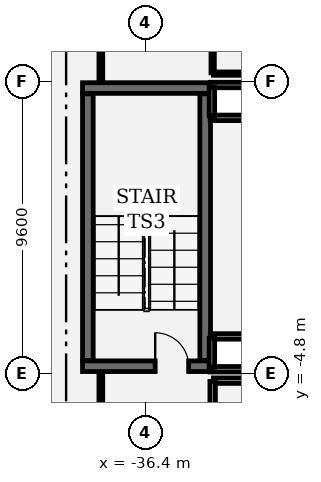
"""IFC4 building model, lengths in metres.
Left out: names, types, materials, properties, quantities, classifications, styles, units other than length and angle.
Written with IfcOpenShell. Run it as: python <this file> out.ifc"""

import sys

from ifc_helpers import new_model, si_unit, direction, frame, frame_2d, origin, place, context, subcontext, project, spatial, rectangle, extrude, element, fill, save


model = new_model("IFC4")
c1 = context("Model", 3, precision=1e-05, world=origin(), true_north=direction((0.0, 1.0)))
c2 = subcontext(c1, "Body", "Model", "MODEL_VIEW")
j1 = project(units=[si_unit("LENGTHUNIT", "METRE"), si_unit("PLANEANGLEUNIT", "RADIAN")], contexts=[c1])
p1 = place(None, origin())
s1 = spatial("IfcSite", under=j1, at=p1, CompositionType="ELEMENT")
p2 = place(p1, origin())
s2 = spatial("IfcBuilding", under=s1, at=p2, CompositionType="ELEMENT")
p3 = place(p2, frame((0.0, 0.0, 268.2)))
s3 = spatial("IfcBuildingStorey", under=s2, at=p3, CompositionType="ELEMENT", Elevation=268.2)
p4 = place(p3, frame((-38.46, -4.575, 0.0), z_axis=(0.0, 0.0, 1.0), x_axis=(1.0, 0.0, 0.0)))
e1 = element("IfcWall", 1, at=p4, inside=s3, PredefinedType="SHEAR", context=c2, shape_type="SweptSolid", body=[
    extrude(rectangle(XDim=4.21, YDim=0.35, at=frame_2d((2.105, 0.0))), origin(), (0.0, 0.0, 1.0), 3.91),
])
p5 = place(p4, frame((2.39, 0.0, 0.0)))
e2 = element("IfcOpeningElement", 2, at=p5, cuts=e1, PredefinedType="OPENING", context=c2, shape_type="SweptSolid", body=[
    extrude(rectangle(XDim=1.1, YDim=2.2, at=frame_2d((0.55, 1.1))), frame((0.0, 0.185, 0.0), z_axis=(0.0, -1.0, 0.0), x_axis=(1.0, 0.0, 0.0)), (0.0, 0.0, 1.0), 0.37),
])
p6 = place(p3, frame((-34.25, 4.575, 0.0), z_axis=(0.0, 0.0, 1.0), x_axis=(-1.0, 0.0, 0.0)))
e3 = element("IfcWall", 3, at=p6, inside=s3, PredefinedType="SHEAR", context=c2, shape_type="SweptSolid", body=[
    extrude(rectangle(XDim=4.21, YDim=0.35, at=frame_2d((2.105, 0.0))), origin(), (0.0, 0.0, 1.0), 3.91),
])
for number, where, z_axis, x_axis in (
    (4, (-34.425, -4.385, 0.0), (0.0, 0.0, 1.0), (0.0, 1.0, 0.0)),
    (5, (-38.285, 4.385, 0.0), (0.0, 0.0, 1.0), (0.0, -1.0, 0.0)),
):
    element("IfcWall", number, at=place(p3, frame(where, z_axis=z_axis, x_axis=x_axis)), inside=s3, PredefinedType="SHEAR", context=c2, shape_type="SweptSolid", body=[
        extrude(rectangle(XDim=8.77, YDim=0.35, at=frame_2d((4.385, 0.0))), origin(), (0.0, 0.0, 1.0), 3.91),
    ])
for number, where, z_axis, x_axis in (
    (6, (-32.99, 3.595, 0.0), (0.0, 0.0, 1.0), (-1.0, 0.0, 0.0)),
    (7, (-34.26, 4.675, 0.0), (0.0, 0.0, 1.0), (1.0, 0.0, 0.0)),
):
    element("IfcWall", number, at=place(p3, frame(where, z_axis=z_axis, x_axis=x_axis)), inside=s3, PredefinedType="PARTITIONING", context=c2, shape_type="SweptSolid", body=[
        extrude(rectangle(XDim=1.27, YDim=0.18, at=frame_2d((0.635, 0.0))), origin(), (0.0, 0.0, 1.0), 3.91),
    ])
p7 = place(p3, frame((-34.205, 3.66, 0.0), z_axis=(0.0, 0.0, 1.0), x_axis=(0.0, 1.0, 0.0)))
e8 = element("IfcWall", 8, at=p7, inside=s3, PredefinedType="PARTITIONING", context=c2, shape_type="SweptSolid", body=[
    extrude(rectangle(XDim=0.95, YDim=0.18, at=frame_2d((0.475, 0.0))), origin(), (0.0, 0.0, 1.0), 3.91),
])
for number, where, z_axis, x_axis in (
    (9, (-32.99, -4.675, 0.0), (0.0, 0.0, 1.0), (-1.0, 0.0, 0.0)),
    (10, (-34.26, -3.595, 0.0), (0.0, 0.0, 1.0), (1.0, 0.0, 0.0)),
):
    element("IfcWall", number, at=place(p3, frame(where, z_axis=z_axis, x_axis=x_axis)), inside=s3, PredefinedType="PARTITIONING", context=c2, shape_type="SweptSolid", body=[
        extrude(rectangle(XDim=1.27, YDim=0.18, at=frame_2d((0.635, 0.0))), origin(), (0.0, 0.0, 1.0), 3.91),
    ])
p8 = place(p3, frame((-34.205, -4.61, 0.0), z_axis=(0.0, 0.0, 1.0), x_axis=(0.0, 1.0, 0.0)))
e11 = element("IfcWall", 11, at=p8, inside=s3, PredefinedType="PARTITIONING", context=c2, shape_type="SweptSolid", body=[
    extrude(rectangle(XDim=0.95, YDim=0.18, at=frame_2d((0.475, 0.0))), origin(), (0.0, 0.0, 1.0), 3.91),
])
p9 = place(p3, frame((-34.18, 8.225, 0.0), z_axis=(0.0, 0.0, 1.0), x_axis=(0.0, -1.0, 0.0)))
e12 = element("IfcWall", 12, at=p9, inside=s3, PredefinedType="PARTITIONING", context=c2, shape_type="SweptSolid", body=[
    extrude(rectangle(XDim=3.15, YDim=0.11, at=frame_2d((1.575, 0.0))), origin(), (0.0, 0.0, 1.0), 3.91),
])
p10 = place(p3, frame((-34.155, 5.05, 0.0), z_axis=(0.0, 0.0, 1.0), x_axis=(1.0, 0.0, 0.0)))
e13 = element("IfcWall", 13, at=p10, inside=s3, PredefinedType="PARTITIONING", context=c2, shape_type="SweptSolid", body=[
    extrude(rectangle(XDim=3.19, YDim=0.11, at=frame_2d((1.595, 0.0))), origin(), (0.0, 0.0, 1.0), 3.91),
])
p11 = place(p3, frame((-30.965, -5.05, 0.0), z_axis=(0.0, 0.0, 1.0), x_axis=(-1.0, 0.0, 0.0)))
e14 = element("IfcWall", 14, at=p11, inside=s3, PredefinedType="PARTITIONING", context=c2, shape_type="SweptSolid", body=[
    extrude(rectangle(XDim=3.19, YDim=0.18, at=frame_2d((1.595, 0.0))), origin(), (0.0, 0.0, 1.0), 3.91),
])
p12 = place(p3, frame((-34.18, -5.075, 0.0), z_axis=(0.0, 0.0, 1.0), x_axis=(0.0, -1.0, 0.0)))
e15 = element("IfcWall", 15, at=p12, inside=s3, PredefinedType="PARTITIONING", context=c2, shape_type="SweptSolid", body=[
    extrude(rectangle(XDim=3.25, YDim=0.18, at=frame_2d((1.625, 0.0))), origin(), (0.0, 0.0, 1.0), 3.91),
])
for number, where, z_axis, x_axis in (
    (16, (-37.858, -4.783, 0.0), (0.0, 0.0, 1.0), (0.0, -1.0, 0.0)),
    (17, (-37.858, 11.265, 0.0), (0.0, 0.0, 1.0), (0.0, -1.0, 0.0)),
):
    element("IfcWall", number, at=place(p3, frame(where, z_axis=z_axis, x_axis=x_axis)), inside=s3, PredefinedType="PARTITIONING", context=c2, shape_type="SweptSolid", body=[
        extrude(rectangle(XDim=6.482, YDim=0.125, at=frame_2d((3.241, 0.0))), origin(), (0.0, 0.0, 1.0), 3.91),
    ])
p13 = place(p5, origin())
e18 = element("IfcDoor", 18, at=p13, inside=s3, OperationType="SINGLE_SWING_LEFT", PredefinedType="DOOR", context=c2, shape_type="SweptSolid", body=[
    extrude(rectangle(XDim=1.1, YDim=2.2, at=frame_2d((0.55, 1.1))), frame((0.0, 0.025, 0.0), z_axis=(0.0, -1.0, 0.0), x_axis=(1.0, 0.0, 0.0)), (0.0, 0.0, 1.0), 0.05),
])
fill(e2, e18)
save(model, sys.argv[1])
